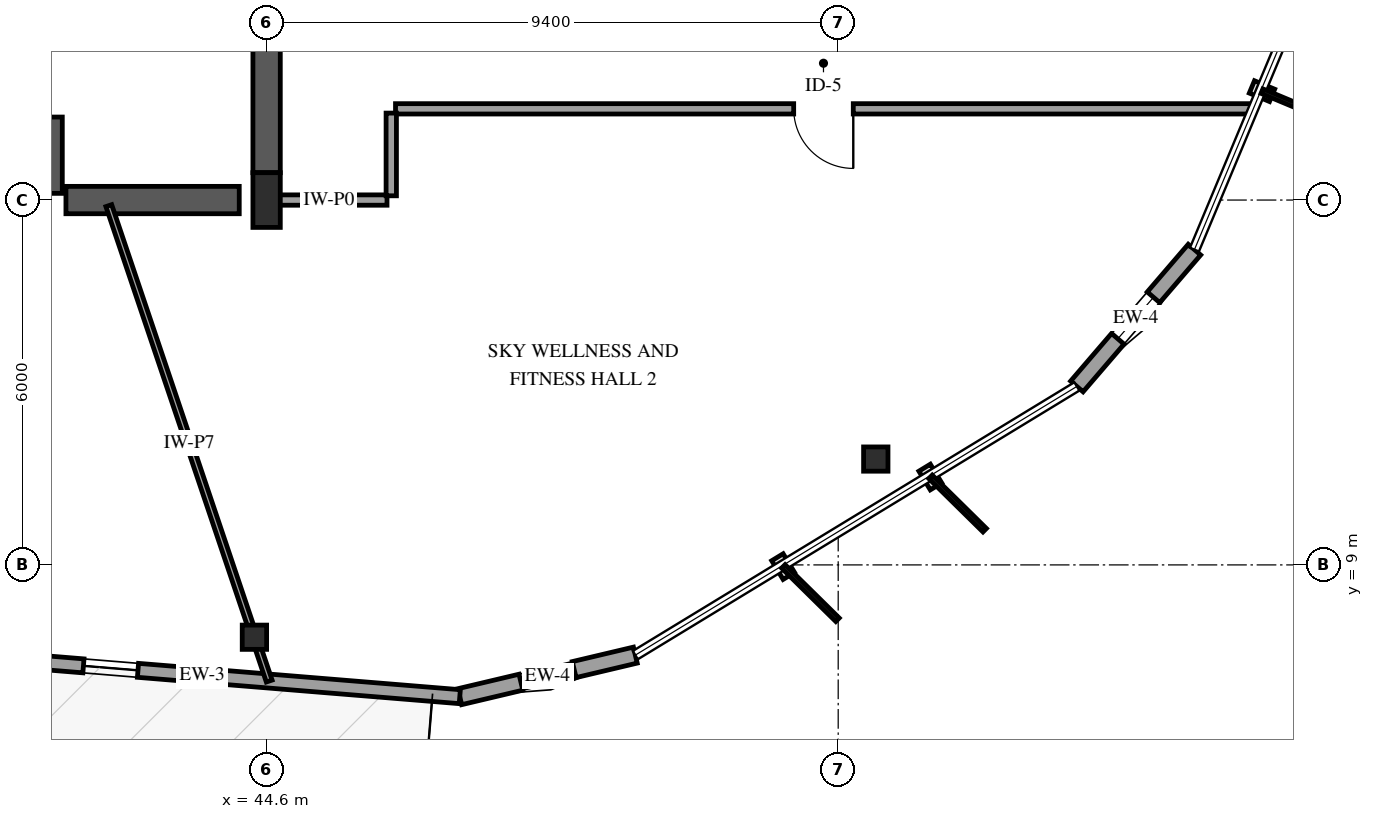
"""IFC4 building model, lengths in metres.
Left out: names, types, materials, properties, quantities, classifications, styles, units other than length and angle.
Written with IfcOpenShell. Run it as: python <this file> out.ifc"""

import sys

from ifc_helpers import new_model, si_unit, direction, frame, frame_2d, origin, origin_2d, place, context, subcontext, project, spatial, rectangle, i_section, extrude, element, fill, save


model = new_model("IFC4")
c1 = context("Model", 3, precision=1e-05, world=origin(), true_north=direction((0.0, 1.0)))
c2 = subcontext(c1, "Body", "Model", "MODEL_VIEW")
j1 = project(units=[si_unit("LENGTHUNIT", "METRE"), si_unit("PLANEANGLEUNIT", "RADIAN")], contexts=[c1])
p1 = place(None, origin())
s1 = spatial("IfcSite", under=j1, at=p1, CompositionType="ELEMENT")
p2 = place(p1, origin())
s2 = spatial("IfcBuilding", under=s1, at=p2, CompositionType="ELEMENT")
p3 = place(p2, frame((0.0, 0.0, 280.0)))
s3 = spatial("IfcBuildingStorey", under=s2, at=p3, CompositionType="ELEMENT", Elevation=280.0)
p4 = place(p3, frame((41.12, 15.11, 0.0), z_axis=(0.0, 0.0, 1.0), x_axis=(0.0, 1.0, 0.0)))
e1 = element("IfcWall", 1, at=p4, inside=s3, PredefinedType="SHEAR", context=c2, shape_type="SweptSolid", body=[
    extrude(rectangle(XDim=3.63, YDim=0.24, at=frame_2d((1.815, 0.0))), origin(), (0.0, 0.0, 1.0), 3.75),
])
p5 = place(p4, frame((1.255, 0.0, 0.0)))
e2 = element("IfcOpeningElement", 2, at=p5, cuts=e1, PredefinedType="OPENING", context=c2, shape_type="SweptSolid", body=[
    extrude(rectangle(XDim=1.12, YDim=2.15, at=frame_2d((0.56, 1.075))), frame((0.0, 0.13, 0.0), z_axis=(0.0, -1.0, 0.0), x_axis=(1.0, 0.0, 0.0)), (0.0, 0.0, 1.0), 0.26),
])
p6 = place(p3, frame((41.3, 15.0, 0.0), z_axis=(0.0, 0.0, 1.0), x_axis=(1.0, 0.0, 0.0)))
e3 = element("IfcWall", 3, at=p6, inside=s3, PredefinedType="SHEAR", context=c2, shape_type="SweptSolid", body=[
    extrude(rectangle(XDim=2.85, YDim=0.45, at=frame_2d((1.425, 0.0))), origin(), (0.0, 0.0, 1.0), 3.75),
])
p7 = place(p3, frame((44.6, 15.45, 0.0), z_axis=(0.0, 0.0, 1.0), x_axis=(0.0, 1.0, 0.0)))
e4 = element("IfcWall", 4, at=p7, inside=s3, PredefinedType="SHEAR", context=c2, shape_type="SweptSolid", body=[
    extrude(rectangle(XDim=6.35, YDim=0.45, at=frame_2d((3.175, 0.0))), origin(), (0.0, 0.0, 1.0), 3.75),
])
p8 = place(p3, frame((44.6, 15.0, 0.0), z_axis=(0.0, 0.0, 1.0), x_axis=(1.0, 0.0, 0.0)))
e5 = element("IfcColumn", 5, at=p8, inside=s3, PredefinedType="PILASTER", context=c2, shape_type="SweptSolid", body=[
    extrude(rectangle(XDim=0.45, YDim=0.9, at=origin_2d()), origin(), (0.0, 0.0, 1.0), 3.75),
])
for number, where, z_axis, x_axis in (
    (6, (44.4, 7.811, 0.0), (0.0, 0.0, 1.0), (1.0, 0.0, 0.0)),
    (7, (54.618, 10.74, 0.0), (0.0, 0.0, 1.0), (1.0, 0.0, 0.0)),
):
    element("IfcColumn", number, at=place(p3, frame(where, z_axis=z_axis, x_axis=x_axis)), inside=s3, PredefinedType="COLUMN", context=c2, shape_type="SweptSolid", body=[
        extrude(i_section(OverallWidth=0.401, OverallDepth=0.399, WebThickness=0.025, FlangeThickness=0.04, FilletRadius=0.038, at=origin_2d()), origin(), (0.0, 0.0, 1.0), 3.75),
    ])
p9 = place(p3, frame((47.777, 6.833, 0.0), z_axis=(0.0, 0.0, 1.0), x_axis=(0.973092427452, 0.230415120242, 0.0)))
e8 = element("IfcWall", 8, at=p9, inside=s3, PredefinedType="SOLIDWALL", context=c2, shape_type="SweptSolid", body=[
    extrude(rectangle(XDim=2.967, YDim=0.27, at=frame_2d((1.483, 0.0))), origin(), (0.0, 0.0, 1.0), 2.789),
])
p10 = place(p9, frame((1.033, 0.0, 0.75)))
e9 = element("IfcOpeningElement", 9, at=p10, cuts=e8, PredefinedType="OPENING", context=c2, shape_type="SweptSolid", body=[
    extrude(rectangle(XDim=0.9, YDim=1.5, at=frame_2d((0.45, 0.75))), frame((0.0, 0.145, 0.0), z_axis=(0.0, -1.0, 0.0), x_axis=(1.0, 0.0, 0.0)), (0.0, 0.0, 1.0), 0.29),
])
p11 = place(p3, frame((39.305, 7.527, 0.0), z_axis=(0.0, 0.0, 1.0), x_axis=(0.996664954759, -0.081602499682, 0.0)))
e10 = element("IfcWall", 10, at=p11, inside=s3, PredefinedType="SOLIDWALL", context=c2, shape_type="SweptSolid", body=[
    extrude(rectangle(XDim=8.5, YDim=0.23, at=frame_2d((4.25, 0.0))), origin(), (0.0, 0.0, 1.0), 2.789),
])
p12 = place(p11, frame((0.65, 0.0, 0.0)))
e11 = element("IfcOpeningElement", 11, at=p12, cuts=e10, PredefinedType="OPENING", context=c2, shape_type="SweptSolid", body=[
    extrude(rectangle(XDim=1.0, YDim=2.15, at=frame_2d((0.5, 1.075))), frame((0.0, 0.125, 0.0), z_axis=(0.0, -1.0, 0.0), x_axis=(1.0, 0.0, 0.0)), (0.0, 0.0, 1.0), 0.25),
])
p13 = place(p11, frame((2.29, 0.0, 0.72)))
e12 = element("IfcOpeningElement", 12, at=p13, cuts=e10, PredefinedType="OPENING", context=c2, shape_type="SweptSolid", body=[
    extrude(rectangle(XDim=0.9, YDim=1.5, at=frame_2d((0.45, 0.75))), frame((0.0, 0.125, 0.0), z_axis=(0.0, -1.0, 0.0), x_axis=(1.0, 0.0, 0.0)), (0.0, 0.0, 1.0), 0.25),
])
p14 = place(p3, frame((57.925, 11.935, 0.0), z_axis=(0.0, 0.0, 1.0), x_axis=(0.651854753915, 0.758343840087, 0.0)))
e13 = element("IfcWall", 13, at=p14, inside=s3, PredefinedType="SOLIDWALL", context=c2, shape_type="SweptSolid", body=[
    extrude(rectangle(XDim=2.967, YDim=0.27, at=frame_2d((1.483, 0.0))), origin(), (0.0, 0.0, 1.0), 2.789),
])
p15 = place(p14, frame((1.033, 0.0, 0.75)))
e14 = element("IfcOpeningElement", 14, at=p15, cuts=e13, PredefinedType="OPENING", context=c2, shape_type="SweptSolid", body=[
    extrude(rectangle(XDim=0.9, YDim=1.5, at=frame_2d((0.45, 0.75))), frame((0.0, 0.145, 0.0), z_axis=(0.0, -1.0, 0.0), x_axis=(1.0, 0.0, 0.0)), (0.0, 0.0, 1.0), 0.29),
])
p16 = place(p3, frame((60.826, 16.5, 0.0), z_axis=(0.0, 0.0, 1.0), x_axis=(-1.0, 0.0, 0.0)))
e15 = element("IfcWall", 15, at=p16, inside=s3, PredefinedType="PARTITIONING", context=c2, shape_type="SweptSolid", body=[
    extrude(rectangle(XDim=14.106, YDim=0.17, at=frame_2d((7.053, 0.0))), origin(), (0.0, 0.0, 1.0), 2.788),
])
p17 = place(p16, frame((6.578, 0.0, 0.0)))
e16 = element("IfcOpeningElement", 16, at=p17, cuts=e15, PredefinedType="OPENING", context=c2, shape_type="SweptSolid", body=[
    extrude(rectangle(XDim=0.98, YDim=2.15, at=frame_2d((0.49, 1.075))), frame((0.0, 0.095, 0.0), z_axis=(0.0, -1.0, 0.0), x_axis=(1.0, 0.0, 0.0)), (0.0, 0.0, 1.0), 0.19),
])
p18 = place(p3, frame((42.005, 14.908, 0.0), z_axis=(0.0, 0.0, 1.0), x_axis=(0.31974079099, -0.947505053589, 0.0)))
e17 = element("IfcWall", 17, at=p18, inside=s3, PredefinedType="PARTITIONING", context=c2, shape_type="SweptSolid", body=[
    extrude(rectangle(XDim=8.251, YDim=0.1, at=frame_2d((4.125, 0.0))), origin(), (0.0, 0.0, 1.0), 2.705),
])
p19 = place(p3, frame((46.58, 15.0, 0.0), z_axis=(0.0, 0.0, 1.0), x_axis=(-1.0, 0.0, 0.0)))
e18 = element("IfcWall", 18, at=p19, inside=s3, PredefinedType="PARTITIONING", context=c2, shape_type="SweptSolid", body=[
    extrude(rectangle(XDim=1.91, YDim=0.17, at=frame_2d((0.955, 0.0))), origin(), (0.0, 0.0, 1.0), 3.41),
])
p20 = place(p3, frame((46.65, 16.43, 0.0), z_axis=(0.0, 0.0, 1.0), x_axis=(0.0, -1.0, 0.0)))
e19 = element("IfcWall", 19, at=p20, inside=s3, PredefinedType="PARTITIONING", context=c2, shape_type="SweptSolid", body=[
    extrude(rectangle(XDim=1.36, YDim=0.17, at=frame_2d((0.68, 0.0))), origin(), (0.0, 0.0, 1.0), 3.41),
])
p21 = place(p10, origin())
e20 = element("IfcWindow", 20, at=p21, inside=s3, PartitioningType="SINGLE_PANEL", PredefinedType="WINDOW", context=c2, shape_type="SweptSolid", body=[
    extrude(rectangle(XDim=0.9, YDim=1.5, at=frame_2d((0.45, 0.75))), frame((0.0, 0.03, 0.0), z_axis=(0.0, -1.0, 0.0), x_axis=(1.0, 0.0, 0.0)), (0.0, 0.0, 1.0), 0.06),
])
fill(e9, e20)
p22 = place(p13, origin())
e21 = element("IfcWindow", 21, at=p22, inside=s3, PartitioningType="SINGLE_PANEL", PredefinedType="WINDOW", context=c2, shape_type="SweptSolid", body=[
    extrude(rectangle(XDim=0.9, YDim=1.5, at=frame_2d((0.45, 0.75))), frame((0.0, 0.03, 0.0), z_axis=(0.0, -1.0, 0.0), x_axis=(1.0, 0.0, 0.0)), (0.0, 0.0, 1.0), 0.06),
])
fill(e12, e21)
p23 = place(p15, origin())
e22 = element("IfcWindow", 22, at=p23, inside=s3, PartitioningType="SINGLE_PANEL", PredefinedType="WINDOW", context=c2, shape_type="SweptSolid", body=[
    extrude(rectangle(XDim=0.9, YDim=1.5, at=frame_2d((0.45, 0.75))), frame((0.0, 0.03, 0.0), z_axis=(0.0, -1.0, 0.0), x_axis=(1.0, 0.0, 0.0)), (0.0, 0.0, 1.0), 0.06),
])
fill(e14, e22)
p24 = place(p5, origin())
e23 = element("IfcDoor", 23, at=p24, inside=s3, OperationType="SINGLE_SWING_LEFT", PredefinedType="DOOR", context=c2, shape_type="SweptSolid", body=[
    extrude(rectangle(XDim=1.12, YDim=2.15, at=frame_2d((0.56, 1.075))), frame((0.0, 0.025, 0.0), z_axis=(0.0, -1.0, 0.0), x_axis=(1.0, 0.0, 0.0)), (0.0, 0.0, 1.0), 0.05),
])
fill(e2, e23)
p25 = place(p17, origin())
e24 = element("IfcDoor", 24, at=p25, inside=s3, OperationType="SINGLE_SWING_LEFT", PredefinedType="DOOR", context=c2, shape_type="SweptSolid", body=[
    extrude(rectangle(XDim=0.98, YDim=2.15, at=frame_2d((0.49, 1.075))), frame((0.0, 0.025, 0.0), z_axis=(0.0, -1.0, 0.0), x_axis=(1.0, 0.0, 0.0)), (0.0, 0.0, 1.0), 0.05),
])
fill(e16, e24)
save(model, sys.argv[1])
